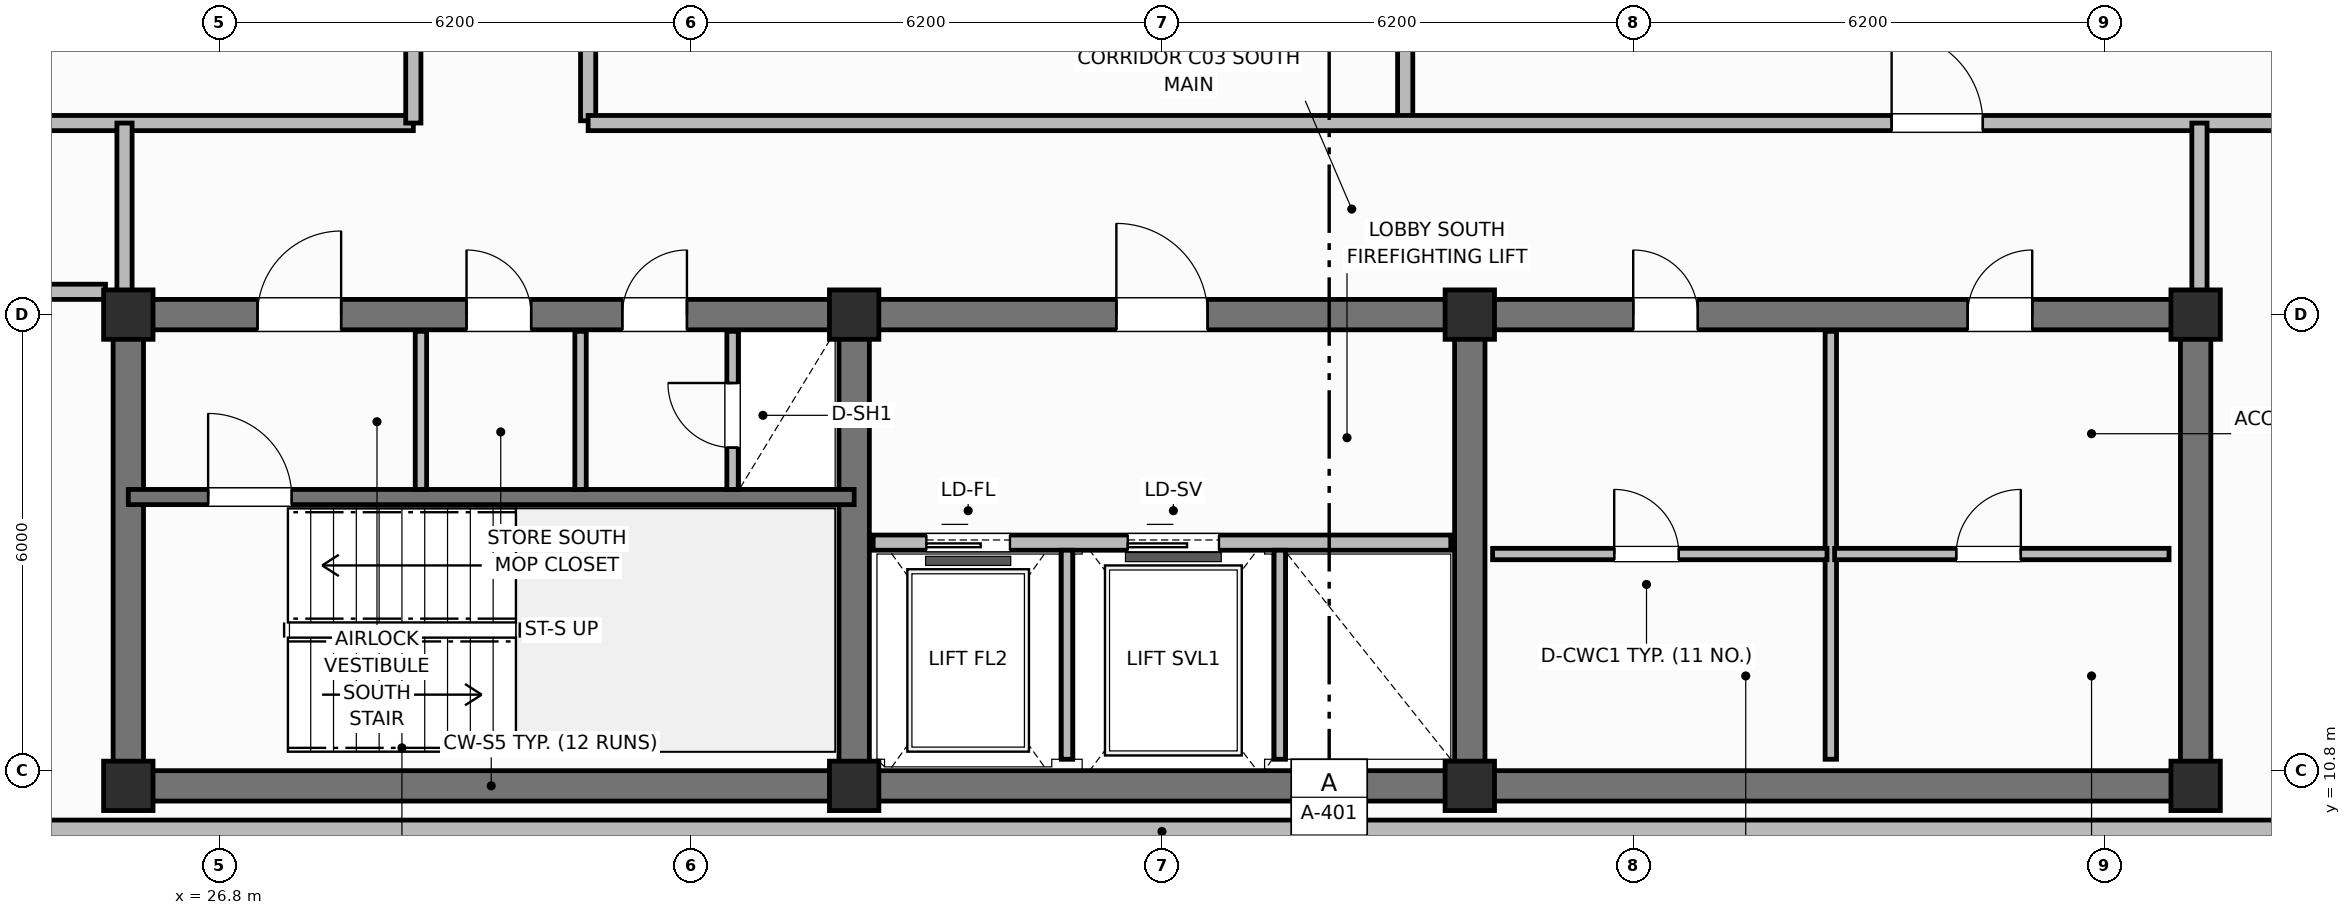
"""IFC4 building model, lengths in metres.
Left out: names, types, materials, properties, quantities, classifications, styles, units other than length and angle.
Written with IfcOpenShell. Run it as: python <this file> out.ifc"""

import sys

from ifc_helpers import new_model, si_unit, direction, frame, frame_2d, origin, origin_2d, place, context, subcontext, project, spatial, rectangle, extrude, element, fill, save


model = new_model("IFC4")
c1 = context("Model", 3, precision=1e-05, world=origin(), true_north=direction((0.0, 1.0)))
c2 = subcontext(c1, "Body", "Model", "MODEL_VIEW")
j1 = project(units=[si_unit("LENGTHUNIT", "METRE"), si_unit("PLANEANGLEUNIT", "RADIAN")], contexts=[c1])
p1 = place(None, origin())
s1 = spatial("IfcSite", under=j1, at=p1, CompositionType="ELEMENT")
p2 = place(p1, origin())
s2 = spatial("IfcBuilding", under=s1, at=p2, CompositionType="ELEMENT")
p3 = place(p2, frame((0.0, 0.0, 309.2)))
s3 = spatial("IfcBuildingStorey", under=s2, at=p3, CompositionType="ELEMENT", Elevation=309.2)
p4 = place(p3, frame((52.8, 10.6, 0.0), z_axis=(0.0, 0.0, 1.0), x_axis=(-1.0, 0.0, 0.0)))
e1 = element("IfcWall", 1, at=p4, inside=s3, PredefinedType="SHEAR", context=c2, shape_type="SweptSolid", body=[
    extrude(rectangle(XDim=27.2, YDim=0.4, at=frame_2d((13.6, 0.0))), origin(), (0.0, 0.0, 1.0), 3.6),
])
for number, where, z_axis, x_axis in (
    (2, (25.6, 10.8, 0.0), (0.0, 0.0, 1.0), (0.0, 1.0, 0.0)),
    (3, (52.8, 10.8, 0.0), (0.0, 0.0, 1.0), (0.0, 1.0, 0.0)),
):
    element("IfcWall", number, at=place(p3, frame(where, z_axis=z_axis, x_axis=x_axis)), inside=s3, PredefinedType="SHEAR", context=c2, shape_type="SweptSolid", body=[
        extrude(rectangle(XDim=5.8, YDim=0.4, at=frame_2d((2.9, 0.0))), origin(), (0.0, 0.0, 1.0), 3.6),
    ])
p5 = place(p3, frame((25.6, 16.8, 0.0), z_axis=(0.0, 0.0, 1.0), x_axis=(1.0, 0.0, 0.0)))
e4 = element("IfcWall", 4, at=p5, inside=s3, PredefinedType="SHEAR", context=c2, shape_type="SweptSolid", body=[
    extrude(rectangle(XDim=27.2, YDim=0.4, at=frame_2d((13.6, 0.0))), origin(), (0.0, 0.0, 1.0), 3.6),
])
p6 = place(p5, frame((1.7, 0.0, 0.0)))
e5 = element("IfcOpeningElement", 5, at=p6, cuts=e4, PredefinedType="OPENING", context=c2, shape_type="SweptSolid", body=[
    extrude(rectangle(XDim=1.1, YDim=2.15, at=frame_2d((0.55, 1.075))), frame((0.0, 0.21, 0.0), z_axis=(0.0, -1.0, 0.0), x_axis=(1.0, 0.0, 0.0)), (0.0, 0.0, 1.0), 0.42),
])
p7 = place(p5, frame((4.45, 0.0, 0.0)))
e6 = element("IfcOpeningElement", 6, at=p7, cuts=e4, PredefinedType="OPENING", context=c2, shape_type="SweptSolid", body=[
    extrude(rectangle(XDim=0.85, YDim=2.1, at=frame_2d((0.425, 1.05))), frame((0.0, 0.21, 0.0), z_axis=(0.0, -1.0, 0.0), x_axis=(1.0, 0.0, 0.0)), (0.0, 0.0, 1.0), 0.42),
])
p8 = place(p5, frame((6.5, 0.0, 0.0)))
e7 = element("IfcOpeningElement", 7, at=p8, cuts=e4, PredefinedType="OPENING", context=c2, shape_type="SweptSolid", body=[
    extrude(rectangle(XDim=0.85, YDim=2.1, at=frame_2d((0.425, 1.05))), frame((0.0, 0.21, 0.0), z_axis=(0.0, -1.0, 0.0), x_axis=(1.0, 0.0, 0.0)), (0.0, 0.0, 1.0), 0.42),
])
p9 = place(p5, frame((13.0, 0.0, 0.0)))
e8 = element("IfcOpeningElement", 8, at=p9, cuts=e4, PredefinedType="OPENING", context=c2, shape_type="SweptSolid", body=[
    extrude(rectangle(XDim=1.2, YDim=2.15, at=frame_2d((0.6, 1.075))), frame((0.0, 0.21, 0.0), z_axis=(0.0, -1.0, 0.0), x_axis=(1.0, 0.0, 0.0)), (0.0, 0.0, 1.0), 0.42),
])
p10 = place(p5, frame((19.8, 0.0, 0.0)))
e9 = element("IfcOpeningElement", 9, at=p10, cuts=e4, PredefinedType="OPENING", context=c2, shape_type="SweptSolid", body=[
    extrude(rectangle(XDim=0.85, YDim=2.1, at=frame_2d((0.425, 1.05))), frame((0.0, 0.21, 0.0), z_axis=(0.0, -1.0, 0.0), x_axis=(1.0, 0.0, 0.0)), (0.0, 0.0, 1.0), 0.42),
])
p11 = place(p5, frame((24.2, 0.0, 0.0)))
e10 = element("IfcOpeningElement", 10, at=p11, cuts=e4, PredefinedType="OPENING", context=c2, shape_type="SweptSolid", body=[
    extrude(rectangle(XDim=0.85, YDim=2.1, at=frame_2d((0.425, 1.05))), frame((0.0, 0.21, 0.0), z_axis=(0.0, -1.0, 0.0), x_axis=(1.0, 0.0, 0.0)), (0.0, 0.0, 1.0), 0.42),
])
for number, where, z_axis, x_axis in (
    (11, (35.15, 10.8, 0.0), (0.0, 0.0, 1.0), (0.0, 1.0, 0.0)),
    (12, (43.25, 10.8, 0.0), (0.0, 0.0, 1.0), (0.0, 1.0, 0.0)),
):
    element("IfcWall", number, at=place(p3, frame(where, z_axis=z_axis, x_axis=x_axis)), inside=s3, PredefinedType="SHEAR", context=c2, shape_type="SweptSolid", body=[
        extrude(rectangle(XDim=5.8, YDim=0.4, at=frame_2d((2.9, 0.0))), origin(), (0.0, 0.0, 1.0), 3.6),
    ])
for number, where, z_axis, x_axis in (
    (13, (25.6, 10.6, 0.0), (0.0, 0.0, 1.0), (1.0, 0.0, 0.0)),
    (14, (25.6, 16.8, 0.0), (0.0, 0.0, 1.0), (1.0, 0.0, 0.0)),
    (15, (35.15, 10.6, 0.0), (0.0, 0.0, 1.0), (1.0, 0.0, 0.0)),
    (16, (35.15, 16.8, 0.0), (0.0, 0.0, 1.0), (1.0, 0.0, 0.0)),
    (17, (43.25, 10.6, 0.0), (0.0, 0.0, 1.0), (1.0, 0.0, 0.0)),
    (18, (43.25, 16.8, 0.0), (0.0, 0.0, 1.0), (1.0, 0.0, 0.0)),
    (19, (52.8, 10.6, 0.0), (0.0, 0.0, 1.0), (1.0, 0.0, 0.0)),
    (20, (52.8, 16.8, 0.0), (0.0, 0.0, 1.0), (1.0, 0.0, 0.0)),
):
    element("IfcColumn", number, at=place(p3, frame(where, z_axis=z_axis, x_axis=x_axis)), inside=s3, PredefinedType="COLUMN", context=c2, shape_type="SweptSolid", body=[
        extrude(rectangle(XDim=0.65, YDim=0.65, at=origin_2d()), origin(), (0.0, 0.0, 1.0), 3.6),
    ])
p12 = place(p3, frame((23.76, 10.0, 0.0), z_axis=(0.0, 0.0, 1.0), x_axis=(1.0, 0.0, 0.0)))
e21 = element("IfcWall", 21, at=p12, inside=s3, PredefinedType="SOLIDWALL", context=c2, shape_type="SweptSolid", body=[
    extrude(rectangle(XDim=30.88, YDim=0.3, at=frame_2d((15.44, 0.0))), origin(), (0.0, 0.0, 1.0), 2.84),
])
p13 = place(p3, frame((25.6, 14.4, 0.0), z_axis=(0.0, 0.0, 1.0), x_axis=(1.0, 0.0, 0.0)))
e22 = element("IfcWall", 22, at=p13, inside=s3, PredefinedType="SHEAR", context=c2, shape_type="SweptSolid", body=[
    extrude(rectangle(XDim=9.55, YDim=0.2, at=frame_2d((4.775, 0.0))), origin(), (0.0, 0.0, 1.0), 3.6),
])
p14 = place(p13, frame((1.05, 0.0, 0.0)))
e23 = element("IfcOpeningElement", 23, at=p14, cuts=e22, PredefinedType="OPENING", context=c2, shape_type="SweptSolid", body=[
    extrude(rectangle(XDim=1.1, YDim=2.15, at=frame_2d((0.55, 1.075))), frame((0.0, 0.11, 0.0), z_axis=(0.0, -1.0, 0.0), x_axis=(1.0, 0.0, 0.0)), (0.0, 0.0, 1.0), 0.22),
])
for number, where, z_axis, x_axis in (
    (24, (29.45, 14.5, 0.0), (0.0, 0.0, 1.0), (0.0, 1.0, 0.0)),
    (25, (31.55, 14.5, 0.0), (0.0, 0.0, 1.0), (0.0, 1.0, 0.0)),
):
    element("IfcWall", number, at=place(p3, frame(where, z_axis=z_axis, x_axis=x_axis)), inside=s3, PredefinedType="PARTITIONING", context=c2, shape_type="SweptSolid", body=[
        extrude(rectangle(XDim=2.08, YDim=0.15, at=frame_2d((1.04, 0.0))), origin(), (0.0, 0.0, 1.0), 2.54),
    ])
p15 = place(p3, frame((33.55, 14.5, 0.0), z_axis=(0.0, 0.0, 1.0), x_axis=(0.0, 1.0, 0.0)))
e26 = element("IfcWall", 26, at=p15, inside=s3, PredefinedType="PARTITIONING", context=c2, shape_type="SweptSolid", body=[
    extrude(rectangle(XDim=2.08, YDim=0.15, at=frame_2d((1.04, 0.0))), origin(), (0.0, 0.0, 1.0), 2.54),
])
p16 = place(p15, frame((0.55, 0.0, 0.0)))
e27 = element("IfcOpeningElement", 27, at=p16, cuts=e26, PredefinedType="OPENING", context=c2, shape_type="SweptSolid", body=[
    extrude(rectangle(XDim=0.85, YDim=2.05, at=frame_2d((0.425, 1.025))), frame((0.0, 0.085, 0.0), z_axis=(0.0, -1.0, 0.0), x_axis=(1.0, 0.0, 0.0)), (0.0, 0.0, 1.0), 0.17),
])
p17 = place(p3, frame((35.4, 13.8, 0.0), z_axis=(0.0, 0.0, 1.0), x_axis=(1.0, 0.0, 0.0)))
e28 = element("IfcWall", 28, at=p17, inside=s3, PredefinedType="PARTITIONING", context=c2, shape_type="SweptSolid", body=[
    extrude(rectangle(XDim=7.6, YDim=0.2, at=frame_2d((3.8, 0.0))), origin(), (0.0, 0.0, 1.0), 2.2),
])
p18 = place(p17, frame((0.7, 0.0, 0.0)))
e29 = element("IfcOpeningElement", 29, at=p18, cuts=e28, PredefinedType="OPENING", context=c2, shape_type="SweptSolid", body=[
    extrude(rectangle(XDim=1.1, YDim=2.15, at=frame_2d((0.55, 1.075))), frame((0.0, 0.11, 0.0), z_axis=(0.0, -1.0, 0.0), x_axis=(1.0, 0.0, 0.0)), (0.0, 0.0, 1.0), 0.22),
])
p19 = place(p17, frame((3.35, 0.0, 0.0)))
e30 = element("IfcOpeningElement", 30, at=p19, cuts=e28, PredefinedType="OPENING", context=c2, shape_type="SweptSolid", body=[
    extrude(rectangle(XDim=1.2, YDim=2.15, at=frame_2d((0.6, 1.075))), frame((0.0, 0.11, 0.0), z_axis=(0.0, -1.0, 0.0), x_axis=(1.0, 0.0, 0.0)), (0.0, 0.0, 1.0), 0.22),
])
for number, where, z_axis, x_axis in (
    (31, (37.95, 10.95, 0.0), (0.0, 0.0, 1.0), (0.0, 1.0, 0.0)),
    (32, (40.75, 10.95, 0.0), (0.0, 0.0, 1.0), (0.0, 1.0, 0.0)),
):
    element("IfcWall", number, at=place(p3, frame(where, z_axis=z_axis, x_axis=x_axis)), inside=s3, PredefinedType="PARTITIONING", context=c2, shape_type="SweptSolid", body=[
        extrude(rectangle(XDim=2.75, YDim=0.15, at=frame_2d((1.375, 0.0))), origin(), (0.0, 0.0, 1.0), 2.54),
    ])
p20 = place(p3, frame((48.0, 10.95, 0.0), z_axis=(0.0, 0.0, 1.0), x_axis=(0.0, 1.0, 0.0)))
e33 = element("IfcWall", 33, at=p20, inside=s3, PredefinedType="PARTITIONING", context=c2, shape_type="SweptSolid", body=[
    extrude(rectangle(XDim=5.63, YDim=0.15, at=frame_2d((2.815, 0.0))), origin(), (0.0, 0.0, 1.0), 2.54),
])
p21 = place(p3, frame((43.55, 13.65, 0.0), z_axis=(0.0, 0.0, 1.0), x_axis=(1.0, 0.0, 0.0)))
e34 = element("IfcWall", 34, at=p21, inside=s3, PredefinedType="PARTITIONING", context=c2, shape_type="SweptSolid", body=[
    extrude(rectangle(XDim=4.4, YDim=0.15, at=frame_2d((2.2, 0.0))), origin(), (0.0, 0.0, 1.0), 2.54),
])
p22 = place(p21, frame((1.6, 0.0, 0.0)))
e35 = element("IfcOpeningElement", 35, at=p22, cuts=e34, PredefinedType="OPENING", context=c2, shape_type="SweptSolid", body=[
    extrude(rectangle(XDim=0.85, YDim=2.1, at=frame_2d((0.425, 1.05))), frame((0.0, 0.085, 0.0), z_axis=(0.0, -1.0, 0.0), x_axis=(1.0, 0.0, 0.0)), (0.0, 0.0, 1.0), 0.17),
])
p23 = place(p3, frame((48.05, 13.65, 0.0), z_axis=(0.0, 0.0, 1.0), x_axis=(1.0, 0.0, 0.0)))
e36 = element("IfcWall", 36, at=p23, inside=s3, PredefinedType="PARTITIONING", context=c2, shape_type="SweptSolid", body=[
    extrude(rectangle(XDim=4.4, YDim=0.15, at=frame_2d((2.2, 0.0))), origin(), (0.0, 0.0, 1.0), 2.54),
])
p24 = place(p23, frame((1.6, 0.0, 0.0)))
e37 = element("IfcOpeningElement", 37, at=p24, cuts=e36, PredefinedType="OPENING", context=c2, shape_type="SweptSolid", body=[
    extrude(rectangle(XDim=0.85, YDim=2.1, at=frame_2d((0.425, 1.05))), frame((0.0, 0.085, 0.0), z_axis=(0.0, -1.0, 0.0), x_axis=(1.0, 0.0, 0.0)), (0.0, 0.0, 1.0), 0.17),
])
p25 = place(p3, frame((21.53, 19.32, 0.0), z_axis=(0.0, 0.0, 1.0), x_axis=(1.0, 0.0, 0.0)))
e38 = element("IfcWall", 38, at=p25, inside=s3, PredefinedType="PARTITIONING", context=c2, shape_type="SweptSolid", body=[
    extrude(rectangle(XDim=7.82, YDim=0.2, at=frame_2d((3.91, 0.0))), origin(), (0.0, 0.0, 1.0), 2.54),
])
p26 = place(p3, frame((29.35, 19.32, 0.0), z_axis=(0.0, 0.0, 1.0), x_axis=(0.0, 1.0, 0.0)))
e39 = element("IfcWall", 39, at=p26, inside=s3, PredefinedType="PARTITIONING", context=c2, shape_type="SweptSolid", body=[
    extrude(rectangle(XDim=17.76, YDim=0.2, at=frame_2d((8.88, 0.0))), origin(), (0.0, 0.0, 1.0), 2.54),
])
p27 = place(p26, frame((6.0, 0.0, 0.0)))
e40 = element("IfcOpeningElement", 40, at=p27, cuts=e39, PredefinedType="OPENING", context=c2, shape_type="SweptSolid", body=[
    extrude(rectangle(XDim=1.2, YDim=2.15, at=frame_2d((0.6, 1.075))), frame((0.0, 0.11, 0.0), z_axis=(0.0, -1.0, 0.0), x_axis=(1.0, 0.0, 0.0)), (0.0, 0.0, 1.0), 0.22),
])
p28 = place(p3, frame((31.65, 19.35, 0.0), z_axis=(0.0, 0.0, 1.0), x_axis=(0.0, 1.0, 0.0)))
e41 = element("IfcWall", 41, at=p28, inside=s3, PredefinedType="PARTITIONING", context=c2, shape_type="SweptSolid", body=[
    extrude(rectangle(XDim=17.7, YDim=0.2, at=frame_2d((8.85, 0.0))), origin(), (0.0, 0.0, 1.0), 2.54),
])
p29 = place(p28, frame((6.0, 0.0, 0.0)))
e42 = element("IfcOpeningElement", 42, at=p29, cuts=e41, PredefinedType="OPENING", context=c2, shape_type="SweptSolid", body=[
    extrude(rectangle(XDim=1.2, YDim=2.15, at=frame_2d((0.6, 1.075))), frame((0.0, 0.11, 0.0), z_axis=(0.0, -1.0, 0.0), x_axis=(1.0, 0.0, 0.0)), (0.0, 0.0, 1.0), 0.22),
])
p30 = place(p3, frame((42.4, 19.35, 0.0), z_axis=(0.0, 0.0, 1.0), x_axis=(0.0, 1.0, 0.0)))
e43 = element("IfcWall", 43, at=p30, inside=s3, PredefinedType="PARTITIONING", context=c2, shape_type="SweptSolid", body=[
    extrude(rectangle(XDim=17.7, YDim=0.2, at=frame_2d((8.85, 0.0))), origin(), (0.0, 0.0, 1.0), 2.54),
])
p31 = place(p3, frame((31.65, 19.32, 0.0), z_axis=(0.0, 0.0, 1.0), x_axis=(1.0, 0.0, 0.0)))
e44 = element("IfcWall", 44, at=p31, inside=s3, PredefinedType="PARTITIONING", context=c2, shape_type="SweptSolid", body=[
    extrude(rectangle(XDim=25.22, YDim=0.2, at=frame_2d((12.61, 0.0))), origin(), (0.0, 0.0, 1.0), 2.54),
])
p32 = place(p31, frame((17.15, 0.0, 0.0)))
e45 = element("IfcOpeningElement", 45, at=p32, cuts=e44, PredefinedType="OPENING", context=c2, shape_type="SweptSolid", body=[
    extrude(rectangle(XDim=1.2, YDim=2.15, at=frame_2d((0.6, 1.075))), frame((0.0, 0.11, 0.0), z_axis=(0.0, -1.0, 0.0), x_axis=(1.0, 0.0, 0.0)), (0.0, 0.0, 1.0), 0.22),
])
for number, where, z_axis, x_axis in (
    (46, (52.85, 16.95, 0.0), (0.0, 0.0, 1.0), (0.0, 1.0, 0.0)),
    (47, (25.55, 16.95, 0.0), (0.0, 0.0, 1.0), (0.0, 1.0, 0.0)),
):
    element("IfcWall", number, at=place(p3, frame(where, z_axis=z_axis, x_axis=x_axis)), inside=s3, PredefinedType="PARTITIONING", context=c2, shape_type="SweptSolid", body=[
        extrude(rectangle(XDim=2.37, YDim=0.2, at=frame_2d((1.185, 0.0))), origin(), (0.0, 0.0, 1.0), 2.54),
    ])
p33 = place(p3, frame((21.53, 17.1, 0.0), z_axis=(0.0, 0.0, 1.0), x_axis=(1.0, 0.0, 0.0)))
e48 = element("IfcWall", 48, at=p33, inside=s3, PredefinedType="PARTITIONING", context=c2, shape_type="SweptSolid", body=[
    extrude(rectangle(XDim=3.77, YDim=0.2, at=frame_2d((1.885, 0.0))), origin(), (0.0, 0.0, 1.0), 2.54),
])
p34 = place(p14, origin())
e49 = element("IfcDoor", 49, at=p34, inside=s3, OperationType="SINGLE_SWING_LEFT", PredefinedType="DOOR", context=c2, shape_type="SweptSolid", body=[
    extrude(rectangle(XDim=1.1, YDim=2.15, at=frame_2d((0.55, 1.075))), frame((0.0, 0.025, 0.0), z_axis=(0.0, -1.0, 0.0), x_axis=(1.0, 0.0, 0.0)), (0.0, 0.0, 1.0), 0.05),
])
fill(e23, e49)
p35 = place(p16, origin())
e50 = element("IfcDoor", 50, at=p35, inside=s3, OperationType="SINGLE_SWING_RIGHT", PredefinedType="TRAPDOOR", context=c2, shape_type="SweptSolid", body=[
    extrude(rectangle(XDim=0.85, YDim=2.05, at=frame_2d((0.425, 1.025))), frame((0.0, 0.025, 0.0), z_axis=(0.0, -1.0, 0.0), x_axis=(1.0, 0.0, 0.0)), (0.0, 0.0, 1.0), 0.05),
])
fill(e27, e50)
p36 = place(p18, origin())
e51 = element("IfcDoor", 51, at=p36, inside=s3, OperationType="SLIDING_TO_LEFT", PredefinedType="DOOR", context=c2, shape_type="SweptSolid", body=[
    extrude(rectangle(XDim=1.1, YDim=2.15, at=frame_2d((0.55, 1.075))), frame((0.0, 0.025, 0.0), z_axis=(0.0, -1.0, 0.0), x_axis=(1.0, 0.0, 0.0)), (0.0, 0.0, 1.0), 0.05),
])
fill(e29, e51)
p37 = place(p19, origin())
e52 = element("IfcDoor", 52, at=p37, inside=s3, OperationType="SLIDING_TO_LEFT", PredefinedType="DOOR", context=c2, shape_type="SweptSolid", body=[
    extrude(rectangle(XDim=1.2, YDim=2.15, at=frame_2d((0.6, 1.075))), frame((0.0, 0.025, 0.0), z_axis=(0.0, -1.0, 0.0), x_axis=(1.0, 0.0, 0.0)), (0.0, 0.0, 1.0), 0.05),
])
fill(e30, e52)
p38 = place(p22, origin())
e53 = element("IfcDoor", 53, at=p38, inside=s3, OperationType="SINGLE_SWING_LEFT", PredefinedType="DOOR", context=c2, shape_type="SweptSolid", body=[
    extrude(rectangle(XDim=0.85, YDim=2.1, at=frame_2d((0.425, 1.05))), frame((0.0, 0.025, 0.0), z_axis=(0.0, -1.0, 0.0), x_axis=(1.0, 0.0, 0.0)), (0.0, 0.0, 1.0), 0.05),
])
fill(e35, e53)
p39 = place(p24, origin())
e54 = element("IfcDoor", 54, at=p39, inside=s3, OperationType="SINGLE_SWING_RIGHT", PredefinedType="DOOR", context=c2, shape_type="SweptSolid", body=[
    extrude(rectangle(XDim=0.85, YDim=2.1, at=frame_2d((0.425, 1.05))), frame((0.0, 0.025, 0.0), z_axis=(0.0, -1.0, 0.0), x_axis=(1.0, 0.0, 0.0)), (0.0, 0.0, 1.0), 0.05),
])
fill(e37, e54)
p40 = place(p32, origin())
e55 = element("IfcDoor", 55, at=p40, inside=s3, OperationType="SINGLE_SWING_LEFT", PredefinedType="DOOR", context=c2, shape_type="SweptSolid", body=[
    extrude(rectangle(XDim=1.2, YDim=2.15, at=frame_2d((0.6, 1.075))), frame((0.0, 0.025, 0.0), z_axis=(0.0, -1.0, 0.0), x_axis=(1.0, 0.0, 0.0)), (0.0, 0.0, 1.0), 0.05),
])
fill(e45, e55)
p41 = place(p6, origin())
e56 = element("IfcDoor", 56, at=p41, inside=s3, OperationType="SINGLE_SWING_RIGHT", PredefinedType="DOOR", context=c2, shape_type="SweptSolid", body=[
    extrude(rectangle(XDim=1.1, YDim=2.15, at=frame_2d((0.55, 1.075))), frame((0.0, 0.025, 0.0), z_axis=(0.0, -1.0, 0.0), x_axis=(1.0, 0.0, 0.0)), (0.0, 0.0, 1.0), 0.05),
])
fill(e5, e56)
p42 = place(p7, origin())
e57 = element("IfcDoor", 57, at=p42, inside=s3, OperationType="SINGLE_SWING_LEFT", PredefinedType="DOOR", context=c2, shape_type="SweptSolid", body=[
    extrude(rectangle(XDim=0.85, YDim=2.1, at=frame_2d((0.425, 1.05))), frame((0.0, 0.025, 0.0), z_axis=(0.0, -1.0, 0.0), x_axis=(1.0, 0.0, 0.0)), (0.0, 0.0, 1.0), 0.05),
])
fill(e6, e57)
p43 = place(p8, origin())
e58 = element("IfcDoor", 58, at=p43, inside=s3, OperationType="SINGLE_SWING_RIGHT", PredefinedType="DOOR", context=c2, shape_type="SweptSolid", body=[
    extrude(rectangle(XDim=0.85, YDim=2.1, at=frame_2d((0.425, 1.05))), frame((0.0, 0.025, 0.0), z_axis=(0.0, -1.0, 0.0), x_axis=(1.0, 0.0, 0.0)), (0.0, 0.0, 1.0), 0.05),
])
fill(e7, e58)
p44 = place(p9, origin())
e59 = element("IfcDoor", 59, at=p44, inside=s3, OperationType="SINGLE_SWING_LEFT", PredefinedType="DOOR", context=c2, shape_type="SweptSolid", body=[
    extrude(rectangle(XDim=1.2, YDim=2.15, at=frame_2d((0.6, 1.075))), frame((0.0, 0.025, 0.0), z_axis=(0.0, -1.0, 0.0), x_axis=(1.0, 0.0, 0.0)), (0.0, 0.0, 1.0), 0.05),
])
fill(e8, e59)
p45 = place(p10, origin())
e60 = element("IfcDoor", 60, at=p45, inside=s3, OperationType="SINGLE_SWING_LEFT", PredefinedType="DOOR", context=c2, shape_type="SweptSolid", body=[
    extrude(rectangle(XDim=0.85, YDim=2.1, at=frame_2d((0.425, 1.05))), frame((0.0, 0.025, 0.0), z_axis=(0.0, -1.0, 0.0), x_axis=(1.0, 0.0, 0.0)), (0.0, 0.0, 1.0), 0.05),
])
fill(e9, e60)
p46 = place(p11, origin())
e61 = element("IfcDoor", 61, at=p46, inside=s3, OperationType="SINGLE_SWING_RIGHT", PredefinedType="DOOR", context=c2, shape_type="SweptSolid", body=[
    extrude(rectangle(XDim=0.85, YDim=2.1, at=frame_2d((0.425, 1.05))), frame((0.0, 0.025, 0.0), z_axis=(0.0, -1.0, 0.0), x_axis=(1.0, 0.0, 0.0)), (0.0, 0.0, 1.0), 0.05),
])
fill(e10, e61)
save(model, sys.argv[1])
